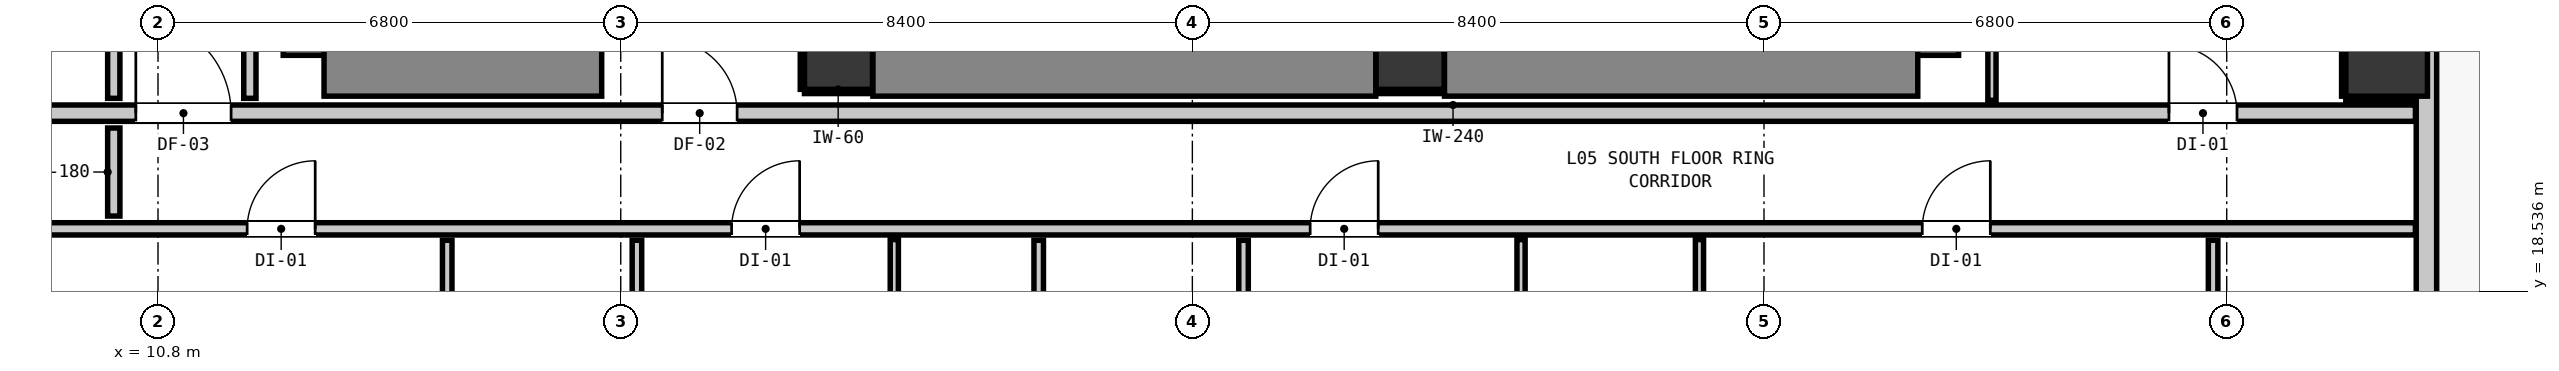
"""IFC4 building model, lengths in metres.
Left out: names, types, materials, properties, quantities, classifications, styles, units other than length and angle.
Written with IfcOpenShell. Run it as: python <this file> out.ifc"""

import sys

from ifc_helpers import new_model, si_unit, direction, frame, frame_2d, origin, origin_2d, place, context, subcontext, project, spatial, rectangle, extrude, element, fill, save


model = new_model("IFC4")
c1 = context("Model", 3, precision=1e-05, world=origin(), true_north=direction((0.0, 1.0)))
c2 = subcontext(c1, "Body", "Model", "MODEL_VIEW")
j1 = project(units=[si_unit("LENGTHUNIT", "METRE"), si_unit("PLANEANGLEUNIT", "RADIAN")], contexts=[c1])
p1 = place(None, origin())
s1 = spatial("IfcSite", under=j1, at=p1, CompositionType="ELEMENT")
p2 = place(p1, origin())
s2 = spatial("IfcBuilding", under=s1, at=p2, CompositionType="ELEMENT")
p3 = place(p2, frame((0.0, 0.0, 22.0)))
s3 = spatial("IfcBuildingStorey", under=s2, at=p3, CompositionType="ELEMENT", Elevation=22.0)
for number, where, z_axis, x_axis in (
    (1, (20.8, 22.0, 0.0), (0.0, 0.0, 1.0), (1.0, 0.0, 0.0)),
    (2, (29.2, 22.0, 0.0), (0.0, 0.0, 1.0), (1.0, 0.0, 0.0)),
):
    element("IfcColumn", number, at=place(p3, frame(where, z_axis=z_axis, x_axis=x_axis)), inside=s3, PredefinedType="COLUMN", context=c2, shape_type="SweptSolid", body=[
        extrude(rectangle(XDim=1.0, YDim=1.0, at=origin_2d()), origin(), (0.0, 0.0, 1.0), 3.32),
    ])
p4 = place(p3, frame((13.24, 22.0, 0.0), z_axis=(0.0, 0.0, 1.0), x_axis=(0.0, 1.0, 0.0)))
e3 = element("IfcWall", 3, at=p4, inside=s3, PredefinedType="SHEAR", context=c2, shape_type="SweptSolid", body=[
    extrude(rectangle(XDim=8.195, YDim=1.2, at=frame_2d((4.098, 0.0))), origin(), (0.0, 0.0, 1.0), 3.32),
])
p5 = place(p3, frame((13.24, 22.0, 0.0), z_axis=(0.0, 0.0, 1.0), x_axis=(1.0, 0.0, 0.0)))
e4 = element("IfcWall", 4, at=p5, inside=s3, PredefinedType="SHEAR", context=c2, shape_type="SweptSolid", body=[
    extrude(rectangle(XDim=4.08, YDim=1.2, at=frame_2d((2.04, 0.0))), origin(), (0.0, 0.0, 1.0), 3.32),
])
p6 = place(p3, frame((36.66, 22.0, 0.0), z_axis=(0.0, 0.0, 1.0), x_axis=(0.0, 1.0, 0.0)))
e5 = element("IfcWall", 5, at=p6, inside=s3, PredefinedType="SHEAR", context=c2, shape_type="SweptSolid", body=[
    extrude(rectangle(XDim=8.195, YDim=1.2, at=frame_2d((4.098, 0.0))), origin(), (0.0, 0.0, 1.0), 3.32),
])
p7 = place(p3, frame((29.705, 22.0, 0.0), z_axis=(0.0, 0.0, 1.0), x_axis=(1.0, 0.0, 0.0)))
e6 = element("IfcWall", 6, at=p7, inside=s3, PredefinedType="SHEAR", context=c2, shape_type="SweptSolid", body=[
    extrude(rectangle(XDim=6.955, YDim=1.2, at=frame_2d((3.478, 0.0))), origin(), (0.0, 0.0, 1.0), 3.32),
])
p8 = place(p3, frame((21.305, 22.0, 0.0), z_axis=(0.0, 0.0, 1.0), x_axis=(1.0, 0.0, 0.0)))
e7 = element("IfcWall", 7, at=p8, inside=s3, PredefinedType="SHEAR", context=c2, shape_type="SweptSolid", body=[
    extrude(rectangle(XDim=7.39, YDim=1.2, at=frame_2d((3.695, 0.0))), origin(), (0.0, 0.0, 1.0), 3.32),
])
p9 = place(p3, frame((43.55, 22.0, -0.2), z_axis=(0.0, 0.0, 1.0), x_axis=(1.0, 0.0, 0.0)))
e8 = element("IfcColumn", 8, at=p9, inside=s3, PredefinedType="COLUMN", context=c2, shape_type="SweptSolid", body=[
    extrude(rectangle(XDim=1.2, YDim=1.2, at=origin_2d()), origin(), (0.0, 0.0, 1.0), 3.52),
])
p10 = place(p3, frame((44.135, 44.835, 0.0), z_axis=(0.0, 0.0, 1.0), x_axis=(0.0, -1.0, 0.0)))
e9 = element("IfcWall", 9, at=p10, inside=s3, PredefinedType="STANDARD", context=c2, shape_type="SweptSolid", body=[
    extrude(rectangle(XDim=34.67, YDim=0.3, at=frame_2d((17.335, 0.0))), origin(), (0.0, 0.0, 1.0), 3.06),
])
p11 = place(p10, frame((0.501, 0.0, 0.0)))
e10 = element("IfcOpeningElement", 10, at=p11, cuts=e9, PredefinedType="OPENING", context=c2, shape_type="SweptSolid", body=[
    extrude(rectangle(XDim=1.1, YDim=2.15, at=frame_2d((0.55, 1.075))), frame((0.0, 0.16, 0.0), z_axis=(0.0, -1.0, 0.0), x_axis=(1.0, 0.0, 0.0)), (0.0, 0.0, 1.0), 0.32),
])
p12 = place(p10, frame((20.21, 0.0, 0.85)))
e11 = element("IfcOpeningElement", 11, at=p12, cuts=e9, PredefinedType="OPENING", context=c2, shape_type="SweptSolid", body=[
    extrude(rectangle(XDim=1.05, YDim=1.65, at=frame_2d((0.525, 0.825))), frame((0.0, 0.16, 0.0), z_axis=(0.0, -1.0, 0.0), x_axis=(1.0, 0.0, 0.0)), (0.0, 0.0, 1.0), 0.32),
])
p13 = place(p10, frame((7.426, 0.0, 0.85)))
e12 = element("IfcOpeningElement", 12, at=p13, cuts=e9, PredefinedType="OPENING", context=c2, shape_type="SweptSolid", body=[
    extrude(rectangle(XDim=1.05, YDim=1.65, at=frame_2d((0.525, 0.825))), frame((0.0, 0.16, 0.0), z_axis=(0.0, -1.0, 0.0), x_axis=(1.0, 0.0, 0.0)), (0.0, 0.0, 1.0), 0.32),
])
p14 = place(p3, frame((1.827, 21.15, 0.0), z_axis=(0.0, 0.0, 1.0), x_axis=(1.0, 0.0, 0.0)))
e13 = element("IfcWall", 13, at=p14, inside=s3, PredefinedType="PARTITIONING", context=c2, shape_type="SweptSolid", body=[
    extrude(rectangle(XDim=42.146, YDim=0.24, at=frame_2d((21.073, 0.0))), origin(), (0.0, 0.0, 1.0), 3.06),
])
p15 = place(p14, frame((16.383, 0.0, 0.0)))
e14 = element("IfcOpeningElement", 14, at=p15, cuts=e13, PredefinedType="OPENING", context=c2, shape_type="SweptSolid", body=[
    extrude(rectangle(XDim=1.1, YDim=2.15, at=frame_2d((0.55, 1.075))), frame((0.0, 0.13, 0.0), z_axis=(0.0, -1.0, 0.0), x_axis=(1.0, 0.0, 0.0)), (0.0, 0.0, 1.0), 0.26),
])
p16 = place(p14, frame((8.647, 0.0, 0.0)))
e15 = element("IfcOpeningElement", 15, at=p16, cuts=e13, PredefinedType="OPENING", context=c2, shape_type="SweptSolid", body=[
    extrude(rectangle(XDim=1.4, YDim=2.15, at=frame_2d((0.7, 1.075))), frame((0.0, 0.13, 0.0), z_axis=(0.0, -1.0, 0.0), x_axis=(1.0, 0.0, 0.0)), (0.0, 0.0, 1.0), 0.26),
])
p17 = place(p14, frame((38.524, 0.0, 0.0)))
e16 = element("IfcOpeningElement", 16, at=p17, cuts=e13, PredefinedType="OPENING", context=c2, shape_type="SweptSolid", body=[
    extrude(rectangle(XDim=1.0, YDim=2.15, at=frame_2d((0.5, 1.075))), frame((0.0, 0.13, 0.0), z_axis=(0.0, -1.0, 0.0), x_axis=(1.0, 0.0, 0.0)), (0.0, 0.0, 1.0), 0.26),
])
p18 = place(p3, frame((1.827, 19.45, 0.0), z_axis=(0.0, 0.0, 1.0), x_axis=(1.0, 0.0, 0.0)))
e17 = element("IfcWall", 17, at=p18, inside=s3, PredefinedType="PARTITIONING", context=c2, shape_type="SweptSolid", body=[
    extrude(rectangle(XDim=42.146, YDim=0.18, at=frame_2d((21.073, 0.0))), origin(), (0.0, 0.0, 1.0), 3.06),
])
p19 = place(p18, frame((10.283, 0.0, 0.0)))
e18 = element("IfcOpeningElement", 18, at=p19, cuts=e17, PredefinedType="OPENING", context=c2, shape_type="SweptSolid", body=[
    extrude(rectangle(XDim=1.0, YDim=2.15, at=frame_2d((0.5, 1.075))), frame((0.0, 0.1, 0.0), z_axis=(0.0, -1.0, 0.0), x_axis=(1.0, 0.0, 0.0)), (0.0, 0.0, 1.0), 0.2),
])
p20 = place(p18, frame((17.402, 0.0, 0.0)))
e19 = element("IfcOpeningElement", 19, at=p20, cuts=e17, PredefinedType="OPENING", context=c2, shape_type="SweptSolid", body=[
    extrude(rectangle(XDim=1.0, YDim=2.15, at=frame_2d((0.5, 1.075))), frame((0.0, 0.1, 0.0), z_axis=(0.0, -1.0, 0.0), x_axis=(1.0, 0.0, 0.0)), (0.0, 0.0, 1.0), 0.2),
])
p21 = place(p18, frame((25.904, 0.0, 0.0)))
e20 = element("IfcOpeningElement", 20, at=p21, cuts=e17, PredefinedType="OPENING", context=c2, shape_type="SweptSolid", body=[
    extrude(rectangle(XDim=1.0, YDim=2.15, at=frame_2d((0.5, 1.075))), frame((0.0, 0.1, 0.0), z_axis=(0.0, -1.0, 0.0), x_axis=(1.0, 0.0, 0.0)), (0.0, 0.0, 1.0), 0.2),
])
p22 = place(p18, frame((34.899, 0.0, 0.0)))
e21 = element("IfcOpeningElement", 21, at=p22, cuts=e17, PredefinedType="OPENING", context=c2, shape_type="SweptSolid", body=[
    extrude(rectangle(XDim=1.0, YDim=2.15, at=frame_2d((0.5, 1.075))), frame((0.0, 0.1, 0.0), z_axis=(0.0, -1.0, 0.0), x_axis=(1.0, 0.0, 0.0)), (0.0, 0.0, 1.0), 0.2),
])
p23 = place(p3, frame((10.15, 19.638, 0.0), z_axis=(0.0, 0.0, 1.0), x_axis=(0.0, 1.0, 0.0)))
e22 = element("IfcWall", 22, at=p23, inside=s3, PredefinedType="PARTITIONING", context=c2, shape_type="SweptSolid", body=[
    extrude(rectangle(XDim=1.294, YDim=0.18, at=frame_2d((0.647, 0.0))), origin(), (0.0, 0.0, 1.0), 3.06),
])
p24 = place(p3, frame((10.15, 21.368, 0.0), z_axis=(0.0, 0.0, 1.0), x_axis=(0.0, 1.0, 0.0)))
e23 = element("IfcWall", 23, at=p24, inside=s3, PredefinedType="PARTITIONING", context=c2, shape_type="SweptSolid", body=[
    extrude(rectangle(XDim=2.074, YDim=0.18, at=frame_2d((1.037, 0.0))), origin(), (0.0, 0.0, 1.0), 3.06),
])
p25 = place(p3, frame((12.15, 21.368, 0.0), z_axis=(0.0, 0.0, 1.0), x_axis=(0.0, 1.0, 0.0)))
e24 = element("IfcWall", 24, at=p25, inside=s3, PredefinedType="PARTITIONING", context=c2, shape_type="SweptSolid", body=[
    extrude(rectangle(XDim=18.694, YDim=0.18, at=frame_2d((9.347, 0.0))), origin(), (0.0, 0.0, 1.0), 3.06),
])
p26 = place(p3, frame((15.05, 13.148, 0.0), z_axis=(0.0, 0.0, 1.0), x_axis=(0.0, 1.0, 0.0)))
e25 = element("IfcWall", 25, at=p26, inside=s3, PredefinedType="PARTITIONING", context=c2, shape_type="SweptSolid", body=[
    extrude(rectangle(XDim=6.134, YDim=0.14, at=frame_2d((3.067, 0.0))), origin(), (0.0, 0.0, 1.0), 3.06),
])
p27 = place(p3, frame((17.838, 13.148, 0.0), z_axis=(0.0, 0.0, 1.0), x_axis=(0.0, 1.0, 0.0)))
e26 = element("IfcWall", 26, at=p27, inside=s3, PredefinedType="PARTITIONING", context=c2, shape_type="SweptSolid", body=[
    extrude(rectangle(XDim=6.134, YDim=0.14, at=frame_2d((3.067, 0.0))), origin(), (0.0, 0.0, 1.0), 3.06),
])
p28 = place(p27, frame((2.634, 0.0, 0.0)))
e27 = element("IfcOpeningElement", 27, at=p28, cuts=e26, PredefinedType="OPENING", context=c2, shape_type="SweptSolid", body=[
    extrude(rectangle(XDim=0.86, YDim=2.02, at=frame_2d((0.43, 1.01))), frame((0.0, 0.08, 0.0), z_axis=(0.0, -1.0, 0.0), x_axis=(1.0, 0.0, 0.0)), (0.0, 0.0, 1.0), 0.16),
])
p29 = place(p3, frame((23.742, 13.148, 0.0), z_axis=(0.0, 0.0, 1.0), x_axis=(0.0, 1.0, 0.0)))
e28 = element("IfcWall", 28, at=p29, inside=s3, PredefinedType="PARTITIONING", context=c2, shape_type="SweptSolid", body=[
    extrude(rectangle(XDim=6.134, YDim=0.14, at=frame_2d((3.067, 0.0))), origin(), (0.0, 0.0, 1.0), 3.06),
])
p30 = place(p3, frame((26.752, 13.148, 0.0), z_axis=(0.0, 0.0, 1.0), x_axis=(0.0, 1.0, 0.0)))
e29 = element("IfcWall", 29, at=p30, inside=s3, PredefinedType="PARTITIONING", context=c2, shape_type="SweptSolid", body=[
    extrude(rectangle(XDim=6.134, YDim=0.14, at=frame_2d((3.067, 0.0))), origin(), (0.0, 0.0, 1.0), 3.06),
])
p31 = place(p30, frame((2.634, 0.0, 0.0)))
e30 = element("IfcOpeningElement", 30, at=p31, cuts=e29, PredefinedType="OPENING", context=c2, shape_type="SweptSolid", body=[
    extrude(rectangle(XDim=0.86, YDim=2.02, at=frame_2d((0.43, 1.01))), frame((0.0, 0.08, 0.0), z_axis=(0.0, -1.0, 0.0), x_axis=(1.0, 0.0, 0.0)), (0.0, 0.0, 1.0), 0.16),
])
p32 = place(p3, frame((41.0, 13.148, 0.0), z_axis=(0.0, 0.0, 1.0), x_axis=(0.0, 1.0, 0.0)))
e31 = element("IfcWall", 31, at=p32, inside=s3, PredefinedType="PARTITIONING", context=c2, shape_type="SweptSolid", body=[
    extrude(rectangle(XDim=6.134, YDim=0.14, at=frame_2d((3.067, 0.0))), origin(), (0.0, 0.0, 1.0), 2.445),
])
p33 = place(p32, frame((2.627, 0.0, 0.0)))
e32 = element("IfcOpeningElement", 32, at=p33, cuts=e31, PredefinedType="OPENING", context=c2, shape_type="SweptSolid", body=[
    extrude(rectangle(XDim=0.9, YDim=2.1, at=frame_2d((0.45, 1.05))), frame((0.0, 0.08, 0.0), z_axis=(0.0, -1.0, 0.0), x_axis=(1.0, 0.0, 0.0)), (0.0, 0.0, 1.0), 0.16),
])
p34 = place(p3, frame((21.62, 7.827, 0.0), z_axis=(0.0, 0.0, 1.0), x_axis=(0.0, 1.0, 0.0)))
e33 = element("IfcWall", 33, at=p34, inside=s3, PredefinedType="PARTITIONING", context=c2, shape_type="SweptSolid", body=[
    extrude(rectangle(XDim=11.465, YDim=0.12, at=frame_2d((5.732, 0.0))), origin(), (0.0, 0.0, 1.0), 3.06),
])
p35 = place(p34, frame((5.348, 0.0, 0.0)))
e34 = element("IfcOpeningElement", 34, at=p35, cuts=e33, PredefinedType="OPENING", context=c2, shape_type="SweptSolid", body=[
    extrude(rectangle(XDim=0.9, YDim=2.1, at=frame_2d((0.45, 1.05))), frame((0.0, 0.07, 0.0), z_axis=(0.0, -1.0, 0.0), x_axis=(1.0, 0.0, 0.0)), (0.0, 0.0, 1.0), 0.14),
])
p36 = place(p3, frame((30.83, 7.827, 0.0), z_axis=(0.0, 0.0, 1.0), x_axis=(0.0, 1.0, 0.0)))
e35 = element("IfcWall", 35, at=p36, inside=s3, PredefinedType="PARTITIONING", context=c2, shape_type="SweptSolid", body=[
    extrude(rectangle(XDim=11.465, YDim=0.12, at=frame_2d((5.732, 0.0))), origin(), (0.0, 0.0, 1.0), 3.06),
])
p37 = place(p36, frame((5.348, 0.0, 0.0)))
e36 = element("IfcOpeningElement", 36, at=p37, cuts=e35, PredefinedType="OPENING", context=c2, shape_type="SweptSolid", body=[
    extrude(rectangle(XDim=0.9, YDim=2.1, at=frame_2d((0.45, 1.05))), frame((0.0, 0.07, 0.0), z_axis=(0.0, -1.0, 0.0), x_axis=(1.0, 0.0, 0.0)), (0.0, 0.0, 1.0), 0.14),
])
p38 = place(p3, frame((33.452, 13.138, 0.0), z_axis=(0.0, 0.0, 1.0), x_axis=(0.0, 1.0, 0.0)))
e37 = element("IfcWall", 37, at=p38, inside=s3, PredefinedType="PARTITIONING", context=c2, shape_type="SweptSolid", body=[
    extrude(rectangle(XDim=6.154, YDim=0.12, at=frame_2d((3.077, 0.0))), origin(), (0.0, 0.0, 1.0), 3.06),
])
p39 = place(p3, frame((37.75, 21.338, 0.0), z_axis=(0.0, 0.0, 1.0), x_axis=(0.0, 1.0, 0.0)))
e38 = element("IfcWall", 38, at=p39, inside=s3, PredefinedType="PARTITIONING", context=c2, shape_type="SweptSolid", body=[
    extrude(rectangle(XDim=4.024, YDim=0.12, at=frame_2d((2.012, 0.0))), origin(), (0.0, 0.0, 1.0), 3.06),
])
p40 = place(p3, frame((20.3, 21.468, 0.0), z_axis=(0.0, 0.0, 1.0), x_axis=(1.0, 0.0, 0.0)))
e39 = element("IfcWall", 39, at=p40, inside=s3, PredefinedType="PARTITIONING", context=c2, shape_type="SweptSolid", body=[
    extrude(rectangle(XDim=0.99, YDim=0.06, at=frame_2d((0.495, 0.0))), origin(), (0.0, 0.0, 1.0), 1.45),
])
p41 = place(p3, frame((20.268, 21.5, 0.0), z_axis=(0.0, 0.0, 1.0), x_axis=(0.0, 1.0, 0.0)))
e40 = element("IfcWall", 40, at=p41, inside=s3, PredefinedType="PARTITIONING", context=c2, shape_type="SweptSolid", body=[
    extrude(rectangle(XDim=1.0, YDim=0.06, at=frame_2d((0.5, 0.0))), origin(), (0.0, 0.0, 1.0), 1.45),
])
p42 = place(p3, frame((28.71, 21.468, 0.0), z_axis=(0.0, 0.0, 1.0), x_axis=(1.0, 0.0, 0.0)))
e41 = element("IfcWall", 41, at=p42, inside=s3, PredefinedType="PARTITIONING", context=c2, shape_type="SweptSolid", body=[
    extrude(rectangle(XDim=0.98, YDim=0.06, at=frame_2d((0.49, 0.0))), origin(), (0.0, 0.0, 1.0), 1.45),
])
p43 = place(p3, frame((42.95, 21.368, 0.0), z_axis=(0.0, 0.0, 1.0), x_axis=(1.0, 0.0, 0.0)))
e42 = element("IfcWall", 42, at=p43, inside=s3, PredefinedType="PARTITIONING", context=c2, shape_type="SweptSolid", body=[
    extrude(rectangle(XDim=1.02, YDim=0.06, at=frame_2d((0.51, 0.0))), origin(), (0.0, 0.0, 1.0), 1.45),
])
p44 = place(p3, frame((42.918, 21.4, 0.0), z_axis=(0.0, 0.0, 1.0), x_axis=(0.0, 1.0, 0.0)))
e43 = element("IfcWall", 43, at=p44, inside=s3, PredefinedType="PARTITIONING", context=c2, shape_type="SweptSolid", body=[
    extrude(rectangle(XDim=1.2, YDim=0.06, at=frame_2d((0.6, 0.0))), origin(), (0.0, 0.0, 1.0), 1.45),
])
p45 = place(p15, origin())
e44 = element("IfcDoor", 44, at=p45, inside=s3, OperationType="SINGLE_SWING_LEFT", PredefinedType="DOOR", context=c2, shape_type="SweptSolid", body=[
    extrude(rectangle(XDim=1.1, YDim=2.15, at=frame_2d((0.55, 1.075))), frame((0.0, 0.025, 0.0), z_axis=(0.0, -1.0, 0.0), x_axis=(1.0, 0.0, 0.0)), (0.0, 0.0, 1.0), 0.05),
])
fill(e14, e44)
p46 = place(p16, origin())
e45 = element("IfcDoor", 45, at=p46, inside=s3, OperationType="SINGLE_SWING_LEFT", PredefinedType="DOOR", context=c2, shape_type="SweptSolid", body=[
    extrude(rectangle(XDim=1.4, YDim=2.15, at=frame_2d((0.7, 1.075))), frame((0.0, 0.025, 0.0), z_axis=(0.0, -1.0, 0.0), x_axis=(1.0, 0.0, 0.0)), (0.0, 0.0, 1.0), 0.05),
])
fill(e15, e45)
p47 = place(p19, origin())
e46 = element("IfcDoor", 46, at=p47, inside=s3, OperationType="SINGLE_SWING_RIGHT", PredefinedType="DOOR", context=c2, shape_type="SweptSolid", body=[
    extrude(rectangle(XDim=1.0, YDim=2.15, at=frame_2d((0.5, 1.075))), frame((0.0, 0.025, 0.0), z_axis=(0.0, -1.0, 0.0), x_axis=(1.0, 0.0, 0.0)), (0.0, 0.0, 1.0), 0.05),
])
fill(e18, e46)
p48 = place(p20, origin())
e47 = element("IfcDoor", 47, at=p48, inside=s3, OperationType="SINGLE_SWING_RIGHT", PredefinedType="DOOR", context=c2, shape_type="SweptSolid", body=[
    extrude(rectangle(XDim=1.0, YDim=2.15, at=frame_2d((0.5, 1.075))), frame((0.0, 0.025, 0.0), z_axis=(0.0, -1.0, 0.0), x_axis=(1.0, 0.0, 0.0)), (0.0, 0.0, 1.0), 0.05),
])
fill(e19, e47)
p49 = place(p21, origin())
e48 = element("IfcDoor", 48, at=p49, inside=s3, OperationType="SINGLE_SWING_RIGHT", PredefinedType="DOOR", context=c2, shape_type="SweptSolid", body=[
    extrude(rectangle(XDim=1.0, YDim=2.15, at=frame_2d((0.5, 1.075))), frame((0.0, 0.025, 0.0), z_axis=(0.0, -1.0, 0.0), x_axis=(1.0, 0.0, 0.0)), (0.0, 0.0, 1.0), 0.05),
])
fill(e20, e48)
p50 = place(p22, origin())
e49 = element("IfcDoor", 49, at=p50, inside=s3, OperationType="SINGLE_SWING_RIGHT", PredefinedType="DOOR", context=c2, shape_type="SweptSolid", body=[
    extrude(rectangle(XDim=1.0, YDim=2.15, at=frame_2d((0.5, 1.075))), frame((0.0, 0.025, 0.0), z_axis=(0.0, -1.0, 0.0), x_axis=(1.0, 0.0, 0.0)), (0.0, 0.0, 1.0), 0.05),
])
fill(e21, e49)
p51 = place(p17, origin())
e50 = element("IfcDoor", 50, at=p51, inside=s3, OperationType="SINGLE_SWING_LEFT", PredefinedType="DOOR", context=c2, shape_type="SweptSolid", body=[
    extrude(rectangle(XDim=1.0, YDim=2.15, at=frame_2d((0.5, 1.075))), frame((0.0, 0.025, 0.0), z_axis=(0.0, -1.0, 0.0), x_axis=(1.0, 0.0, 0.0)), (0.0, 0.0, 1.0), 0.05),
])
fill(e16, e50)
save(model, sys.argv[1])
